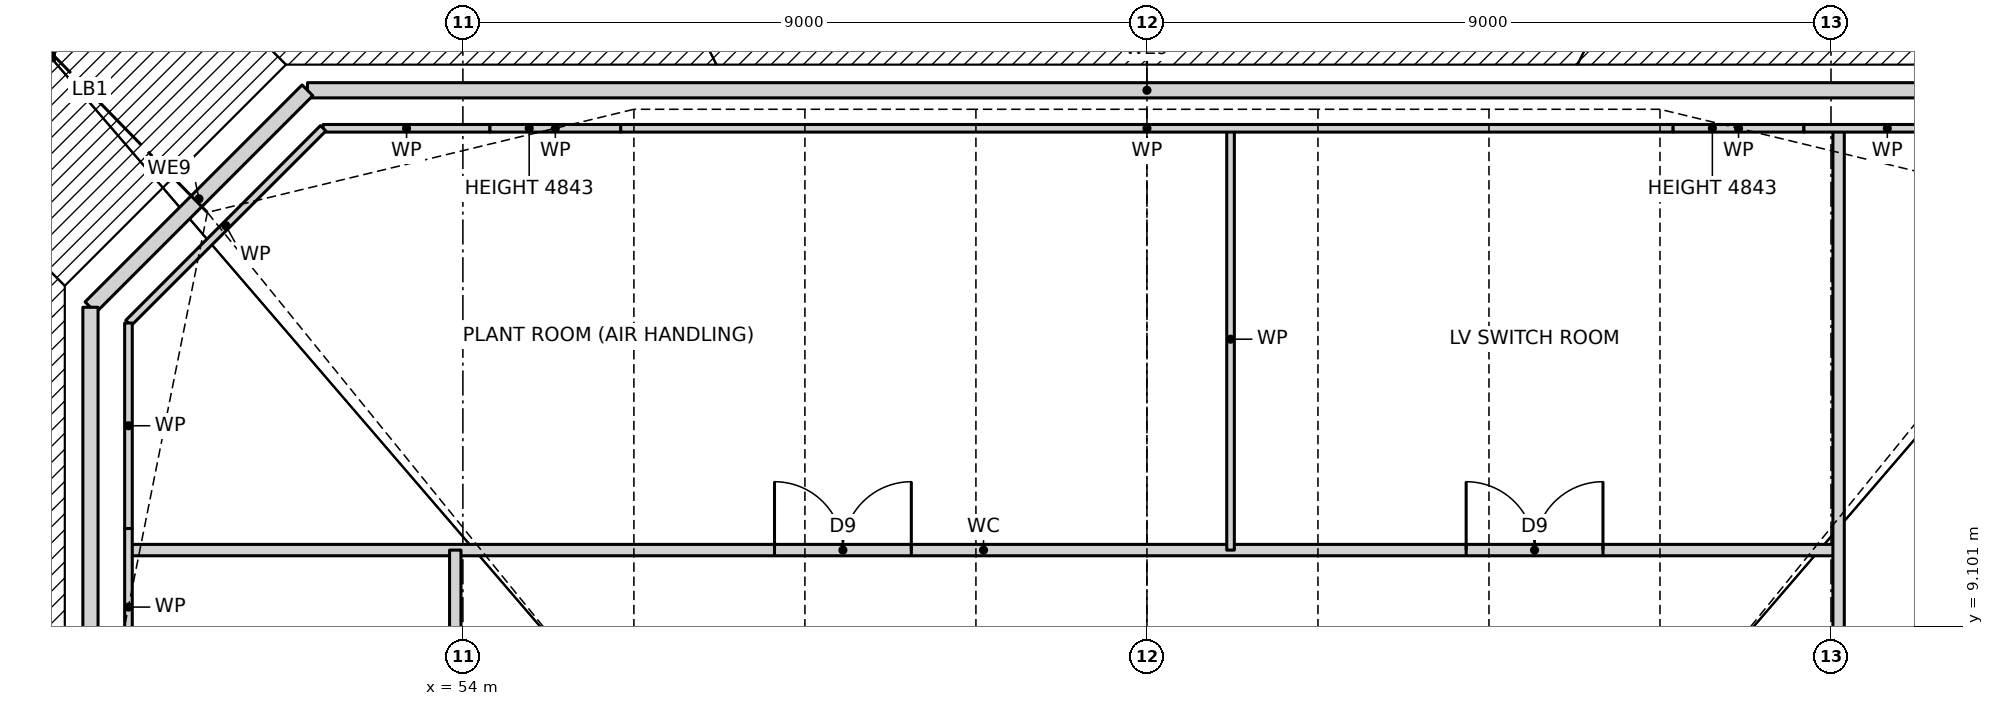
"""IFC4 building model, lengths in metres.
Left out: names, types, materials, properties, quantities, classifications, styles, units other than length and angle.
Written with IfcOpenShell. Run it as: python <this file> out.ifc"""

import sys

from ifc_helpers import new_model, si_unit, direction, frame, frame_2d, origin, origin_2d, place, context, subcontext, project, spatial, rectangle, i_section, extrude, clip, halfspace, element, fill, save


model = new_model("IFC4")
c1 = context("Model", 3, precision=1e-05, world=origin(), true_north=direction((0.0, 1.0)))
c2 = subcontext(c1, "Body", "Model", "MODEL_VIEW")
j1 = project(units=[si_unit("LENGTHUNIT", "METRE"), si_unit("PLANEANGLEUNIT", "RADIAN")], contexts=[c1])
p1 = place(None, origin())
s1 = spatial("IfcSite", under=j1, at=p1, CompositionType="ELEMENT")
p2 = place(p1, origin())
s2 = spatial("IfcBuilding", under=s1, at=p2, CompositionType="ELEMENT")
p3 = place(p2, frame((0.0, 0.0, 74.5)))
s3 = spatial("IfcBuildingStorey", under=s2, at=p3, CompositionType="ELEMENT", Elevation=74.5)
p4 = place(p3, frame((71.1, 18.15, 0.0), z_axis=(-0.206163197348, -0.343580475001, 0.916214600002), x_axis=(0.857476506072, -0.514523120505, 0.0)))
e1 = element("IfcColumn", 1, at=p4, inside=s3, PredefinedType="COLUMN", context=c2, shape_type="Clipping", body=[
    clip(clip(extrude(i_section(OverallWidth=0.424, OverallDepth=0.475, WebThickness=0.048, FlangeThickness=0.077, at=origin_2d()), origin(), (0.0, 0.0, 1.0), 6.549), halfspace(frame((0.0, 0.0, 0.0), z_axis=(0.0, -0.400687916891, -0.916214600002), x_axis=(0.857476506072, 0.471413595046, -0.206163197348)), False)), halfspace(frame((0.0, 2.404, 5.497), z_axis=(0.0, 0.400687916891, 0.916214600002), x_axis=(0.857476506072, 0.471413595046, -0.206163197348)), False)),
])
p5 = place(p3, frame((65.7, 18.15, 0.0), z_axis=(-0.070044605522, -0.350261033367, 0.934029422311), x_axis=(0.980584767795, -0.196095673508, 0.0)))
e2 = element("IfcColumn", 2, at=p5, inside=s3, PredefinedType="COLUMN", context=c2, shape_type="Clipping", body=[
    clip(clip(extrude(i_section(OverallWidth=0.424, OverallDepth=0.475, WebThickness=0.048, FlangeThickness=0.077, at=origin_2d()), origin(), (0.0, 0.0, 1.0), 6.424), halfspace(frame((0.0, 0.0, 0.0), z_axis=(0.0, -0.357196078167, -0.934029422311), x_axis=(0.980584767795, 0.183159128644, -0.070044605522)), False)), halfspace(frame((0.0, 2.143, 5.604), z_axis=(0.0, 0.357196078167, 0.934029422311), x_axis=(0.980584767795, 0.183159128644, -0.070044605522)), False)),
])
p6 = place(p3, frame((60.3, 18.15, 0.0), z_axis=(0.070044605522, -0.350261033367, 0.934029422311), x_axis=(0.980584767795, 0.196095673508, 0.0)))
e3 = element("IfcColumn", 3, at=p6, inside=s3, PredefinedType="COLUMN", context=c2, shape_type="Clipping", body=[
    clip(clip(extrude(i_section(OverallWidth=0.424, OverallDepth=0.475, WebThickness=0.048, FlangeThickness=0.077, at=origin_2d()), origin(), (0.0, 0.0, 1.0), 6.424), halfspace(frame((0.0, 0.0, 0.0), z_axis=(0.0, -0.357196078167, -0.934029422311), x_axis=(0.980584767795, -0.183159128644, 0.070044605522)), False)), halfspace(frame((0.0, 2.143, 5.604), z_axis=(0.0, 0.357196078167, 0.934029422311), x_axis=(0.980584767795, -0.183159128644, 0.070044605522)), False)),
])
p7 = place(p3, frame((54.9, 18.15, 0.0), z_axis=(0.206163197348, -0.343580475001, 0.916214600002), x_axis=(0.857476506072, 0.514523120505, 0.0)))
e4 = element("IfcColumn", 4, at=p7, inside=s3, PredefinedType="COLUMN", context=c2, shape_type="Clipping", body=[
    clip(clip(extrude(i_section(OverallWidth=0.424, OverallDepth=0.475, WebThickness=0.048, FlangeThickness=0.077, at=origin_2d()), origin(), (0.0, 0.0, 1.0), 6.549), halfspace(frame((0.0, 0.0, 0.0), z_axis=(0.0, -0.400687916891, -0.916214600002), x_axis=(0.857476506072, -0.471413595046, 0.206163197348)), False)), halfspace(frame((0.0, 2.404, 5.497), z_axis=(0.0, 0.400687916891, 0.916214600002), x_axis=(0.857476506072, -0.471413595046, 0.206163197348)), False)),
])
p8 = place(p3, frame((48.394, 16.797, 0.0), z_axis=(0.330551321937, -0.331953334069, 0.883483337458), x_axis=(0.708601594959, 0.705608800698, 0.0)))
e5 = element("IfcColumn", 5, at=p8, inside=s3, PredefinedType="COLUMN", context=c2, shape_type="Clipping", body=[
    clip(clip(extrude(i_section(OverallWidth=0.424, OverallDepth=0.475, WebThickness=0.048, FlangeThickness=0.077, at=origin_2d()), origin(), (0.0, 0.0, 1.0), 6.791), halfspace(frame((0.0, 0.0, 0.0), z_axis=(0.0, -0.468462583814, -0.883483337458), x_axis=(0.708601594959, -0.62339361818, 0.330551321937)), False)), halfspace(frame((0.0, 2.811, 5.301), z_axis=(0.0, 0.468462583814, 0.883483337458), x_axis=(0.708601594959, -0.62339361818, 0.330551321937)), False)),
])
p9 = place(p3, frame((47.1, 9.45, 0.0), z_axis=(0.343583115532, -0.206127500627, 0.91622164142), x_axis=(0.514454704863, 0.857517554715, 0.0)))
e6 = element("IfcColumn", 6, at=p9, inside=s3, PredefinedType="COLUMN", context=c2, shape_type="Clipping", body=[
    clip(clip(extrude(i_section(OverallWidth=0.424, OverallDepth=0.475, WebThickness=0.048, FlangeThickness=0.077, at=origin_2d()), origin(), (0.0, 0.0, 1.0), 6.549), halfspace(frame((0.0, 0.0, 0.0), z_axis=(0.0, -0.400671815572, -0.91622164142), x_axis=(0.514454704863, -0.785676141527, 0.343583115532)), False)), halfspace(frame((0.0, 2.404, 5.497), z_axis=(0.0, 0.400671815572, 0.91622164142), x_axis=(0.514454704863, -0.785676141527, 0.343583115532)), False)),
])
p10 = place(p3, frame((74.045, 16.15, 0.0), z_axis=(0.0, 0.0, 1.0), x_axis=(-1.0, 0.0, 0.0)))
e7 = element("IfcWall", 7, at=p10, inside=s3, PredefinedType="PARTITIONING", context=c2, shape_type="SweptSolid", body=[
    extrude(rectangle(XDim=22.09, YDim=0.2, at=frame_2d((11.045, 0.0))), origin(), (0.0, 0.0, 1.0), 5.7),
])
p11 = place(p3, frame((51.955, 16.15, 0.0), z_axis=(0.0, 0.0, 1.0), x_axis=(-0.707106781187, -0.707106781187, 0.0)))
e8 = element("IfcWall", 8, at=p11, inside=s3, PredefinedType="PARTITIONING", context=c2, shape_type="SweptSolid", body=[
    extrude(rectangle(XDim=4.038, YDim=0.2, at=frame_2d((2.019, 0.0))), origin(), (0.0, 0.0, 1.0), 5.7),
])
p12 = place(p3, frame((49.1, 13.295, 0.0), z_axis=(0.0, 0.0, 1.0), x_axis=(0.0, -1.0, 0.0)))
e9 = element("IfcWall", 9, at=p12, inside=s3, PredefinedType="PARTITIONING", context=c2, shape_type="SweptSolid", body=[
    extrude(rectangle(XDim=26.59, YDim=0.2, at=frame_2d((13.295, 0.0))), origin(), (0.0, 0.0, 1.0), 5.7),
])
p13 = place(p3, frame((49.6, 10.1, 0.0), z_axis=(0.0, 0.0, 1.0), x_axis=(1.0, 0.0, 0.0)))
e10 = element("IfcWall", 10, at=p13, inside=s3, PredefinedType="PARTITIONING", context=c2, shape_type="SweptSolid", body=[
    extrude(rectangle(XDim=22.5, YDim=0.15, at=frame_2d((11.25, 0.0))), origin(), (0.0, 0.0, 1.0), 5.77),
])
p14 = place(p13, frame((17.6, 0.0, 0.0)))
e11 = element("IfcOpeningElement", 11, at=p14, cuts=e10, PredefinedType="OPENING", context=c2, shape_type="SweptSolid", body=[
    extrude(rectangle(XDim=1.8, YDim=2.1, at=frame_2d((0.9, 1.05))), frame((0.0, 0.085, 0.0), z_axis=(0.0, -1.0, 0.0), x_axis=(1.0, 0.0, 0.0)), (0.0, 0.0, 1.0), 0.17),
])
p15 = place(p13, frame((8.5, 0.0, 0.0)))
e12 = element("IfcOpeningElement", 12, at=p15, cuts=e10, PredefinedType="OPENING", context=c2, shape_type="SweptSolid", body=[
    extrude(rectangle(XDim=1.8, YDim=2.1, at=frame_2d((0.9, 1.05))), frame((0.0, 0.085, 0.0), z_axis=(0.0, -1.0, 0.0), x_axis=(1.0, 0.0, 0.0)), (0.0, 0.0, 1.0), 0.17),
])
p16 = place(p3, frame((52.162, 15.65, 0.0), z_axis=(0.0, 0.0, 1.0), x_axis=(1.0, 0.0, 0.0)))
e13 = element("IfcWall", 13, at=p16, inside=s3, PredefinedType="PARTITIONING", context=c2, shape_type="SweptSolid", body=[
    extrude(rectangle(XDim=2.194, YDim=0.1, at=frame_2d((1.097, 0.0))), origin(), (0.0, 0.0, 1.0), 5.77),
])
p17 = place(p3, frame((49.6, 13.088, 0.0), z_axis=(0.0, 0.0, 1.0), x_axis=(0.707106781187, 0.707106781187, 0.0)))
e14 = element("IfcWall", 14, at=p17, inside=s3, PredefinedType="PARTITIONING", context=c2, shape_type="SweptSolid", body=[
    extrude(rectangle(XDim=3.623, YDim=0.1, at=frame_2d((1.812, 0.0))), origin(), (0.0, 0.0, 1.0), 5.77),
])
p18 = place(p3, frame((72.1, -10.1, 0.0), z_axis=(0.0, 0.0, 1.0), x_axis=(0.0, 1.0, 0.0)))
e15 = element("IfcWall", 15, at=p18, inside=s3, PredefinedType="PARTITIONING", context=c2, shape_type="SweptSolid", body=[
    extrude(rectangle(XDim=25.75, YDim=0.15, at=frame_2d((12.875, 0.0))), origin(), (0.0, 0.0, 1.0), 5.77),
])
p19 = place(p18, frame((9.2, 0.0, 0.0)))
e16 = element("IfcOpeningElement", 16, at=p19, cuts=e15, PredefinedType="OPENING", context=c2, shape_type="SweptSolid", body=[
    extrude(rectangle(XDim=1.8, YDim=2.1, at=frame_2d((0.9, 1.05))), frame((0.0, 0.085, 0.0), z_axis=(0.0, -1.0, 0.0), x_axis=(1.0, 0.0, 0.0)), (0.0, 0.0, 1.0), 0.17),
])
p20 = place(p3, frame((64.1, 10.1, 0.0), z_axis=(0.0, 0.0, 1.0), x_axis=(0.0, 1.0, 0.0)))
e17 = element("IfcWall", 17, at=p20, inside=s3, PredefinedType="PARTITIONING", context=c2, shape_type="SweptSolid", body=[
    extrude(rectangle(XDim=5.55, YDim=0.1, at=frame_2d((2.775, 0.0))), origin(), (0.0, 0.0, 1.0), 5.77),
])
p21 = place(p3, frame((53.9, -15.65, 0.0), z_axis=(0.0, 0.0, 1.0), x_axis=(0.0, 1.0, 0.0)))
e18 = element("IfcWall", 18, at=p21, inside=s3, PredefinedType="PARTITIONING", context=c2, shape_type="SweptSolid", body=[
    extrude(rectangle(XDim=25.75, YDim=0.15, at=frame_2d((12.875, 0.0))), origin(), (0.0, 0.0, 1.0), 5.77),
])
p22 = place(p21, frame((14.75, 0.0, 0.0)))
e19 = element("IfcOpeningElement", 19, at=p22, cuts=e18, PredefinedType="OPENING", context=c2, shape_type="SweptSolid", body=[
    extrude(rectangle(XDim=1.8, YDim=2.1, at=frame_2d((0.9, 1.05))), frame((0.0, 0.085, 0.0), z_axis=(0.0, -1.0, 0.0), x_axis=(1.0, 0.0, 0.0)), (0.0, 0.0, 1.0), 0.17),
])
p23 = place(p3, frame((54.356, 15.65, 0.0), z_axis=(0.0, 0.0, 1.0), x_axis=(1.0, 0.0, 0.0)))
e20 = element("IfcWall", 20, at=p23, inside=s3, PredefinedType="PARTITIONING", context=c2, shape_type="SweptSolid", body=[
    extrude(rectangle(XDim=1.721, YDim=0.1, at=frame_2d((0.86, 0.0))), origin(), (0.0, 0.0, 1.0), 4.843),
])
p24 = place(p3, frame((56.077, 15.65, 0.0), z_axis=(0.0, 0.0, 1.0), x_axis=(1.0, 0.0, 0.0)))
e21 = element("IfcWall", 21, at=p24, inside=s3, PredefinedType="PARTITIONING", context=c2, shape_type="SweptSolid", body=[
    extrude(rectangle(XDim=13.846, YDim=0.1, at=frame_2d((6.923, 0.0))), origin(), (0.0, 0.0, 1.0), 5.77),
])
p25 = place(p3, frame((69.923, 15.65, 0.0), z_axis=(0.0, 0.0, 1.0), x_axis=(1.0, 0.0, 0.0)))
e22 = element("IfcWall", 22, at=p25, inside=s3, PredefinedType="PARTITIONING", context=c2, shape_type="SweptSolid", body=[
    extrude(rectangle(XDim=1.721, YDim=0.1, at=frame_2d((0.86, 0.0))), origin(), (0.0, 0.0, 1.0), 4.843),
])
p26 = place(p3, frame((71.644, 15.65, 0.0), z_axis=(0.0, 0.0, 1.0), x_axis=(1.0, 0.0, 0.0)))
e23 = element("IfcWall", 23, at=p26, inside=s3, PredefinedType="PARTITIONING", context=c2, shape_type="SweptSolid", body=[
    extrude(rectangle(XDim=2.194, YDim=0.1, at=frame_2d((1.097, 0.0))), origin(), (0.0, 0.0, 1.0), 5.77),
])
p27 = place(p3, frame((49.6, 8.316, 0.0), z_axis=(0.0, 0.0, 1.0), x_axis=(0.0, 1.0, 0.0)))
e24 = element("IfcWall", 24, at=p27, inside=s3, PredefinedType="PARTITIONING", context=c2, shape_type="SweptSolid", body=[
    extrude(rectangle(XDim=2.068, YDim=0.1, at=frame_2d((1.034, 0.0))), origin(), (0.0, 0.0, 1.0), 4.843),
])
p28 = place(p3, frame((49.6, 10.384, 0.0), z_axis=(0.0, 0.0, 1.0), x_axis=(0.0, 1.0, 0.0)))
e25 = element("IfcWall", 25, at=p28, inside=s3, PredefinedType="PARTITIONING", context=c2, shape_type="SweptSolid", body=[
    extrude(rectangle(XDim=2.704, YDim=0.1, at=frame_2d((1.352, 0.0))), origin(), (0.0, 0.0, 1.0), 5.77),
])
p29 = place(p14, origin())
e26 = element("IfcDoor", 26, at=p29, inside=s3, OperationType="DOUBLE_DOOR_SINGLE_SWING", PredefinedType="DOOR", context=c2, shape_type="SweptSolid", body=[
    extrude(rectangle(XDim=1.8, YDim=2.1, at=frame_2d((0.9, 1.05))), frame((0.0, 0.025, 0.0), z_axis=(0.0, -1.0, 0.0), x_axis=(1.0, 0.0, 0.0)), (0.0, 0.0, 1.0), 0.05),
])
fill(e11, e26)
p30 = place(p15, origin())
e27 = element("IfcDoor", 27, at=p30, inside=s3, OperationType="DOUBLE_DOOR_SINGLE_SWING", PredefinedType="DOOR", context=c2, shape_type="SweptSolid", body=[
    extrude(rectangle(XDim=1.8, YDim=2.1, at=frame_2d((0.9, 1.05))), frame((0.0, 0.025, 0.0), z_axis=(0.0, -1.0, 0.0), x_axis=(1.0, 0.0, 0.0)), (0.0, 0.0, 1.0), 0.05),
])
fill(e12, e27)
save(model, sys.argv[1])
